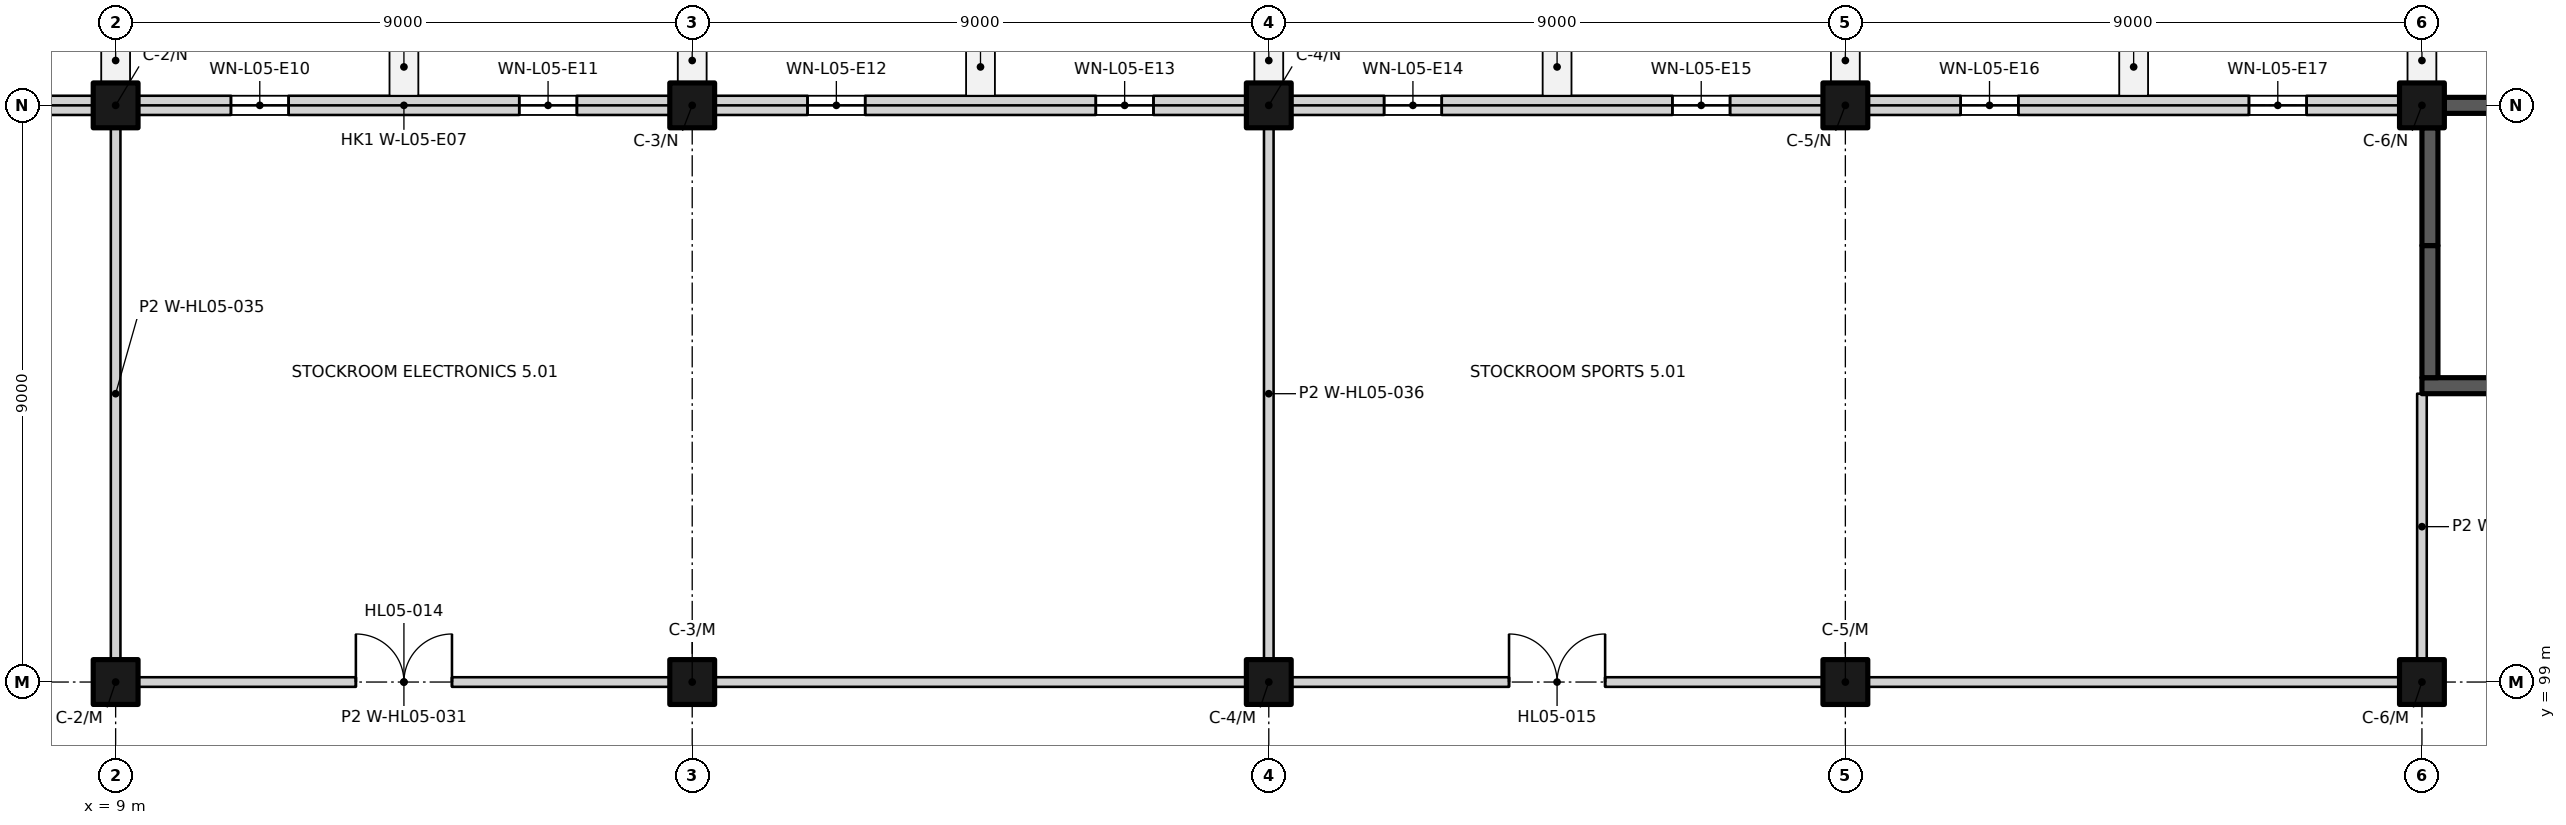
"""IFC4 building model, lengths in metres.
Left out: names, types, materials, properties, quantities, classifications, styles, units other than length and angle.
Written with IfcOpenShell. Run it as: python <this file> out.ifc"""

import sys

from ifc_helpers import new_model, si_unit, direction, frame, frame_2d, origin, origin_2d, place, context, subcontext, project, spatial, rectangle, extrude, element, fill, save


model = new_model("IFC4")
c1 = context("Model", 3, precision=1e-05, world=origin(), true_north=direction((0.0, 1.0)))
c2 = subcontext(c1, "Body", "Model", "MODEL_VIEW")
j1 = project(units=[si_unit("LENGTHUNIT", "METRE"), si_unit("PLANEANGLEUNIT", "RADIAN")], contexts=[c1])
p1 = place(None, origin())
s1 = spatial("IfcSite", under=j1, at=p1, CompositionType="ELEMENT")
p2 = place(p1, origin())
s2 = spatial("IfcBuilding", under=s1, at=p2, CompositionType="ELEMENT")
p3 = place(p2, frame((0.0, 0.0, 24.0)))
s3 = spatial("IfcBuildingStorey", under=s2, at=p3, CompositionType="ELEMENT", Elevation=24.0)
for number, where, z_axis, x_axis in (
    (1, (9.0, 99.0, 0.0), (0.0, 0.0, 1.0), (1.0, 0.0, 0.0)),
    (2, (18.0, 99.0, 0.0), (0.0, 0.0, 1.0), (1.0, 0.0, 0.0)),
    (3, (27.0, 99.0, 0.0), (0.0, 0.0, 1.0), (1.0, 0.0, 0.0)),
    (4, (36.0, 99.0, 0.0), (0.0, 0.0, 1.0), (1.0, 0.0, 0.0)),
    (5, (45.0, 99.0, 0.0), (0.0, 0.0, 1.0), (1.0, 0.0, 0.0)),
    (6, (9.0, 108.0, 0.0), (0.0, 0.0, 1.0), (1.0, 0.0, 0.0)),
    (7, (18.0, 108.0, 0.0), (0.0, 0.0, 1.0), (1.0, 0.0, 0.0)),
    (8, (27.0, 108.0, 0.0), (0.0, 0.0, 1.0), (1.0, 0.0, 0.0)),
    (9, (36.0, 108.0, 0.0), (0.0, 0.0, 1.0), (1.0, 0.0, 0.0)),
    (10, (45.0, 108.0, 0.0), (0.0, 0.0, 1.0), (1.0, 0.0, 0.0)),
):
    element("IfcColumn", number, at=place(p3, frame(where, z_axis=z_axis, x_axis=x_axis)), inside=s3, PredefinedType="COLUMN", context=c2, shape_type="SweptSolid", body=[
        extrude(rectangle(XDim=0.7, YDim=0.7, at=origin_2d()), origin(), (0.0, 0.0, 1.0), 4.5),
    ])
p4 = place(p3, frame((45.0, 103.625, 0.0), z_axis=(0.0, 0.0, 1.0), x_axis=(1.0, 0.0, 0.0)))
e11 = element("IfcWall", 11, at=p4, inside=s3, PredefinedType="SHEAR", context=c2, shape_type="SweptSolid", body=[
    extrude(rectangle(XDim=9.0, YDim=0.25, at=frame_2d((4.5, 0.0))), origin(), (0.0, 0.0, 1.0), 4.2),
])
p5 = place(p3, frame((45.35, 108.0, 0.0), z_axis=(0.0, 0.0, 1.0), x_axis=(1.0, 0.0, 0.0)))
e12 = element("IfcWall", 12, at=p5, inside=s3, PredefinedType="SHEAR", context=c2, shape_type="SweptSolid", body=[
    extrude(rectangle(XDim=8.3, YDim=0.25, at=frame_2d((4.15, 0.0))), origin(), (0.0, 0.0, 1.0), 3.7),
])
p6 = place(p3, frame((45.125, 103.75, 0.0), z_axis=(0.0, 0.0, 1.0), x_axis=(0.0, 1.0, 0.0)))
e13 = element("IfcWall", 13, at=p6, inside=s3, PredefinedType="SHEAR", context=c2, shape_type="SweptSolid", body=[
    extrude(rectangle(XDim=2.062, YDim=0.25, at=frame_2d((1.031, 0.0))), origin(), (0.0, 0.0, 1.0), 4.2),
])
p7 = place(p3, frame((45.125, 105.812, 0.0), z_axis=(0.0, 0.0, 1.0), x_axis=(0.0, 1.0, 0.0)))
e14 = element("IfcWall", 14, at=p7, inside=s3, PredefinedType="SHEAR", context=c2, shape_type="SweptSolid", body=[
    extrude(rectangle(XDim=1.838, YDim=0.25, at=frame_2d((0.919, 0.0))), origin(), (0.0, 0.0, 1.0), 4.2),
])
p8 = place(p3, frame((4.5, 108.0, 0.0), z_axis=(0.0, 0.0, 1.0), x_axis=(1.0, 0.0, 0.0)))
e15 = element("IfcWall", 15, at=p8, inside=s3, PredefinedType="SOLIDWALL", context=c2, shape_type="SweptSolid", body=[
    extrude(rectangle(XDim=4.15, YDim=0.3, at=frame_2d((2.075, 0.0))), origin(), (0.0, 0.0, 1.0), 3.7),
])
p9 = place(p8, frame((1.8, 0.0, 0.45)))
e16 = element("IfcOpeningElement", 16, at=p9, cuts=e15, PredefinedType="OPENING", context=c2, shape_type="SweptSolid", body=[
    extrude(rectangle(XDim=0.9, YDim=3.0, at=frame_2d((0.45, 1.5))), frame((0.0, 0.16, 0.0), z_axis=(0.0, -1.0, 0.0), x_axis=(1.0, 0.0, 0.0)), (0.0, 0.0, 1.0), 0.32),
])
p10 = place(p3, frame((9.35, 108.0, 0.0), z_axis=(0.0, 0.0, 1.0), x_axis=(1.0, 0.0, 0.0)))
e17 = element("IfcWall", 17, at=p10, inside=s3, PredefinedType="SOLIDWALL", context=c2, shape_type="SweptSolid", body=[
    extrude(rectangle(XDim=8.3, YDim=0.3, at=frame_2d((4.15, 0.0))), origin(), (0.0, 0.0, 1.0), 3.7),
])
p11 = place(p10, frame((1.45, 0.0, 0.45)))
e18 = element("IfcOpeningElement", 18, at=p11, cuts=e17, PredefinedType="OPENING", context=c2, shape_type="SweptSolid", body=[
    extrude(rectangle(XDim=0.9, YDim=3.0, at=frame_2d((0.45, 1.5))), frame((0.0, 0.16, 0.0), z_axis=(0.0, -1.0, 0.0), x_axis=(1.0, 0.0, 0.0)), (0.0, 0.0, 1.0), 0.32),
])
p12 = place(p10, frame((5.95, 0.0, 0.45)))
e19 = element("IfcOpeningElement", 19, at=p12, cuts=e17, PredefinedType="OPENING", context=c2, shape_type="SweptSolid", body=[
    extrude(rectangle(XDim=0.9, YDim=3.0, at=frame_2d((0.45, 1.5))), frame((0.0, 0.16, 0.0), z_axis=(0.0, -1.0, 0.0), x_axis=(1.0, 0.0, 0.0)), (0.0, 0.0, 1.0), 0.32),
])
p13 = place(p3, frame((18.35, 108.0, 0.0), z_axis=(0.0, 0.0, 1.0), x_axis=(1.0, 0.0, 0.0)))
e20 = element("IfcWall", 20, at=p13, inside=s3, PredefinedType="SOLIDWALL", context=c2, shape_type="SweptSolid", body=[
    extrude(rectangle(XDim=8.3, YDim=0.3, at=frame_2d((4.15, 0.0))), origin(), (0.0, 0.0, 1.0), 3.7),
])
p14 = place(p13, frame((1.45, 0.0, 0.45)))
e21 = element("IfcOpeningElement", 21, at=p14, cuts=e20, PredefinedType="OPENING", context=c2, shape_type="SweptSolid", body=[
    extrude(rectangle(XDim=0.9, YDim=3.0, at=frame_2d((0.45, 1.5))), frame((0.0, 0.16, 0.0), z_axis=(0.0, -1.0, 0.0), x_axis=(1.0, 0.0, 0.0)), (0.0, 0.0, 1.0), 0.32),
])
p15 = place(p13, frame((5.95, 0.0, 0.45)))
e22 = element("IfcOpeningElement", 22, at=p15, cuts=e20, PredefinedType="OPENING", context=c2, shape_type="SweptSolid", body=[
    extrude(rectangle(XDim=0.9, YDim=3.0, at=frame_2d((0.45, 1.5))), frame((0.0, 0.16, 0.0), z_axis=(0.0, -1.0, 0.0), x_axis=(1.0, 0.0, 0.0)), (0.0, 0.0, 1.0), 0.32),
])
p16 = place(p3, frame((27.35, 108.0, 0.0), z_axis=(0.0, 0.0, 1.0), x_axis=(1.0, 0.0, 0.0)))
e23 = element("IfcWall", 23, at=p16, inside=s3, PredefinedType="SOLIDWALL", context=c2, shape_type="SweptSolid", body=[
    extrude(rectangle(XDim=8.3, YDim=0.3, at=frame_2d((4.15, 0.0))), origin(), (0.0, 0.0, 1.0), 3.7),
])
p17 = place(p16, frame((1.45, 0.0, 0.45)))
e24 = element("IfcOpeningElement", 24, at=p17, cuts=e23, PredefinedType="OPENING", context=c2, shape_type="SweptSolid", body=[
    extrude(rectangle(XDim=0.9, YDim=3.0, at=frame_2d((0.45, 1.5))), frame((0.0, 0.16, 0.0), z_axis=(0.0, -1.0, 0.0), x_axis=(1.0, 0.0, 0.0)), (0.0, 0.0, 1.0), 0.32),
])
p18 = place(p16, frame((5.95, 0.0, 0.45)))
e25 = element("IfcOpeningElement", 25, at=p18, cuts=e23, PredefinedType="OPENING", context=c2, shape_type="SweptSolid", body=[
    extrude(rectangle(XDim=0.9, YDim=3.0, at=frame_2d((0.45, 1.5))), frame((0.0, 0.16, 0.0), z_axis=(0.0, -1.0, 0.0), x_axis=(1.0, 0.0, 0.0)), (0.0, 0.0, 1.0), 0.32),
])
p19 = place(p3, frame((36.35, 108.0, 0.0), z_axis=(0.0, 0.0, 1.0), x_axis=(1.0, 0.0, 0.0)))
e26 = element("IfcWall", 26, at=p19, inside=s3, PredefinedType="SOLIDWALL", context=c2, shape_type="SweptSolid", body=[
    extrude(rectangle(XDim=8.3, YDim=0.3, at=frame_2d((4.15, 0.0))), origin(), (0.0, 0.0, 1.0), 3.7),
])
p20 = place(p19, frame((1.45, 0.0, 0.45)))
e27 = element("IfcOpeningElement", 27, at=p20, cuts=e26, PredefinedType="OPENING", context=c2, shape_type="SweptSolid", body=[
    extrude(rectangle(XDim=0.9, YDim=3.0, at=frame_2d((0.45, 1.5))), frame((0.0, 0.16, 0.0), z_axis=(0.0, -1.0, 0.0), x_axis=(1.0, 0.0, 0.0)), (0.0, 0.0, 1.0), 0.32),
])
p21 = place(p19, frame((5.95, 0.0, 0.45)))
e28 = element("IfcOpeningElement", 28, at=p21, cuts=e26, PredefinedType="OPENING", context=c2, shape_type="SweptSolid", body=[
    extrude(rectangle(XDim=0.9, YDim=3.0, at=frame_2d((0.45, 1.5))), frame((0.0, 0.16, 0.0), z_axis=(0.0, -1.0, 0.0), x_axis=(1.0, 0.0, 0.0)), (0.0, 0.0, 1.0), 0.32),
])
p22 = place(p3, frame((9.35, 99.0, 0.0), z_axis=(0.0, 0.0, 1.0), x_axis=(1.0, 0.0, 0.0)))
e29 = element("IfcWall", 29, at=p22, inside=s3, PredefinedType="PARTITIONING", context=c2, shape_type="SweptSolid", body=[
    extrude(rectangle(XDim=8.3, YDim=0.15, at=frame_2d((4.15, 0.0))), origin(), (0.0, 0.0, 1.0), 4.2),
])
p23 = place(p22, frame((3.4, 0.0, 0.0)))
e30 = element("IfcOpeningElement", 30, at=p23, cuts=e29, PredefinedType="OPENING", context=c2, shape_type="SweptSolid", body=[
    extrude(rectangle(XDim=1.5, YDim=2.1, at=frame_2d((0.75, 1.05))), frame((0.0, 0.085, 0.0), z_axis=(0.0, -1.0, 0.0), x_axis=(1.0, 0.0, 0.0)), (0.0, 0.0, 1.0), 0.17),
])
p24 = place(p3, frame((18.35, 99.0, 0.0), z_axis=(0.0, 0.0, 1.0), x_axis=(1.0, 0.0, 0.0)))
e31 = element("IfcWall", 31, at=p24, inside=s3, PredefinedType="PARTITIONING", context=c2, shape_type="SweptSolid", body=[
    extrude(rectangle(XDim=8.3, YDim=0.15, at=frame_2d((4.15, 0.0))), origin(), (0.0, 0.0, 1.0), 4.2),
])
p25 = place(p3, frame((27.35, 99.0, 0.0), z_axis=(0.0, 0.0, 1.0), x_axis=(1.0, 0.0, 0.0)))
e32 = element("IfcWall", 32, at=p25, inside=s3, PredefinedType="PARTITIONING", context=c2, shape_type="SweptSolid", body=[
    extrude(rectangle(XDim=8.3, YDim=0.15, at=frame_2d((4.15, 0.0))), origin(), (0.0, 0.0, 1.0), 4.2),
])
p26 = place(p25, frame((3.4, 0.0, 0.0)))
e33 = element("IfcOpeningElement", 33, at=p26, cuts=e32, PredefinedType="OPENING", context=c2, shape_type="SweptSolid", body=[
    extrude(rectangle(XDim=1.5, YDim=2.1, at=frame_2d((0.75, 1.05))), frame((0.0, 0.085, 0.0), z_axis=(0.0, -1.0, 0.0), x_axis=(1.0, 0.0, 0.0)), (0.0, 0.0, 1.0), 0.17),
])
for number, where, z_axis, x_axis in (
    (34, (36.35, 99.0, 0.0), (0.0, 0.0, 1.0), (1.0, 0.0, 0.0)),
    (35, (9.0, 99.35, 0.0), (0.0, 0.0, 1.0), (0.0, 1.0, 0.0)),
    (36, (27.0, 99.35, 0.0), (0.0, 0.0, 1.0), (0.0, 1.0, 0.0)),
):
    element("IfcWall", number, at=place(p3, frame(where, z_axis=z_axis, x_axis=x_axis)), inside=s3, PredefinedType="PARTITIONING", context=c2, shape_type="SweptSolid", body=[
        extrude(rectangle(XDim=8.3, YDim=0.15, at=frame_2d((4.15, 0.0))), origin(), (0.0, 0.0, 1.0), 4.2),
    ])
p27 = place(p3, frame((45.0, 99.35, 0.0), z_axis=(0.0, 0.0, 1.0), x_axis=(0.0, 1.0, 0.0)))
e37 = element("IfcWall", 37, at=p27, inside=s3, PredefinedType="PARTITIONING", context=c2, shape_type="SweptSolid", body=[
    extrude(rectangle(XDim=4.15, YDim=0.15, at=frame_2d((2.075, 0.0))), origin(), (0.0, 0.0, 1.0), 4.2),
])
p28 = place(p11, origin())
e38 = element("IfcWindow", 38, at=p28, inside=s3, PartitioningType="SINGLE_PANEL", PredefinedType="WINDOW", context=c2, shape_type="SweptSolid", body=[
    extrude(rectangle(XDim=0.9, YDim=3.0, at=frame_2d((0.45, 1.5))), frame((0.0, -0.03, 0.0), z_axis=(0.0, -1.0, 0.0), x_axis=(1.0, 0.0, 0.0)), (0.0, 0.0, 1.0), 0.06),
])
fill(e18, e38)
p29 = place(p12, origin())
e39 = element("IfcWindow", 39, at=p29, inside=s3, PartitioningType="SINGLE_PANEL", PredefinedType="WINDOW", context=c2, shape_type="SweptSolid", body=[
    extrude(rectangle(XDim=0.9, YDim=3.0, at=frame_2d((0.45, 1.5))), frame((0.0, -0.03, 0.0), z_axis=(0.0, -1.0, 0.0), x_axis=(1.0, 0.0, 0.0)), (0.0, 0.0, 1.0), 0.06),
])
fill(e19, e39)
p30 = place(p14, origin())
e40 = element("IfcWindow", 40, at=p30, inside=s3, PartitioningType="SINGLE_PANEL", PredefinedType="WINDOW", context=c2, shape_type="SweptSolid", body=[
    extrude(rectangle(XDim=0.9, YDim=3.0, at=frame_2d((0.45, 1.5))), frame((0.0, -0.03, 0.0), z_axis=(0.0, -1.0, 0.0), x_axis=(1.0, 0.0, 0.0)), (0.0, 0.0, 1.0), 0.06),
])
fill(e21, e40)
p31 = place(p15, origin())
e41 = element("IfcWindow", 41, at=p31, inside=s3, PartitioningType="SINGLE_PANEL", PredefinedType="WINDOW", context=c2, shape_type="SweptSolid", body=[
    extrude(rectangle(XDim=0.9, YDim=3.0, at=frame_2d((0.45, 1.5))), frame((0.0, -0.03, 0.0), z_axis=(0.0, -1.0, 0.0), x_axis=(1.0, 0.0, 0.0)), (0.0, 0.0, 1.0), 0.06),
])
fill(e22, e41)
p32 = place(p17, origin())
e42 = element("IfcWindow", 42, at=p32, inside=s3, PartitioningType="SINGLE_PANEL", PredefinedType="WINDOW", context=c2, shape_type="SweptSolid", body=[
    extrude(rectangle(XDim=0.9, YDim=3.0, at=frame_2d((0.45, 1.5))), frame((0.0, -0.03, 0.0), z_axis=(0.0, -1.0, 0.0), x_axis=(1.0, 0.0, 0.0)), (0.0, 0.0, 1.0), 0.06),
])
fill(e24, e42)
p33 = place(p18, origin())
e43 = element("IfcWindow", 43, at=p33, inside=s3, PartitioningType="SINGLE_PANEL", PredefinedType="WINDOW", context=c2, shape_type="SweptSolid", body=[
    extrude(rectangle(XDim=0.9, YDim=3.0, at=frame_2d((0.45, 1.5))), frame((0.0, -0.03, 0.0), z_axis=(0.0, -1.0, 0.0), x_axis=(1.0, 0.0, 0.0)), (0.0, 0.0, 1.0), 0.06),
])
fill(e25, e43)
p34 = place(p20, origin())
e44 = element("IfcWindow", 44, at=p34, inside=s3, PartitioningType="SINGLE_PANEL", PredefinedType="WINDOW", context=c2, shape_type="SweptSolid", body=[
    extrude(rectangle(XDim=0.9, YDim=3.0, at=frame_2d((0.45, 1.5))), frame((0.0, -0.03, 0.0), z_axis=(0.0, -1.0, 0.0), x_axis=(1.0, 0.0, 0.0)), (0.0, 0.0, 1.0), 0.06),
])
fill(e27, e44)
p35 = place(p21, origin())
e45 = element("IfcWindow", 45, at=p35, inside=s3, PartitioningType="SINGLE_PANEL", PredefinedType="WINDOW", context=c2, shape_type="SweptSolid", body=[
    extrude(rectangle(XDim=0.9, YDim=3.0, at=frame_2d((0.45, 1.5))), frame((0.0, -0.03, 0.0), z_axis=(0.0, -1.0, 0.0), x_axis=(1.0, 0.0, 0.0)), (0.0, 0.0, 1.0), 0.06),
])
fill(e28, e45)
p36 = place(p23, origin())
e46 = element("IfcDoor", 46, at=p36, inside=s3, OperationType="DOUBLE_DOOR_SINGLE_SWING", PredefinedType="DOOR", context=c2, shape_type="SweptSolid", body=[
    extrude(rectangle(XDim=1.5, YDim=2.1, at=frame_2d((0.75, 1.05))), frame((0.0, 0.025, 0.0), z_axis=(0.0, -1.0, 0.0), x_axis=(1.0, 0.0, 0.0)), (0.0, 0.0, 1.0), 0.05),
])
fill(e30, e46)
p37 = place(p26, origin())
e47 = element("IfcDoor", 47, at=p37, inside=s3, OperationType="DOUBLE_DOOR_SINGLE_SWING", PredefinedType="DOOR", context=c2, shape_type="SweptSolid", body=[
    extrude(rectangle(XDim=1.5, YDim=2.1, at=frame_2d((0.75, 1.05))), frame((0.0, 0.025, 0.0), z_axis=(0.0, -1.0, 0.0), x_axis=(1.0, 0.0, 0.0)), (0.0, 0.0, 1.0), 0.05),
])
fill(e33, e47)
save(model, sys.argv[1])
